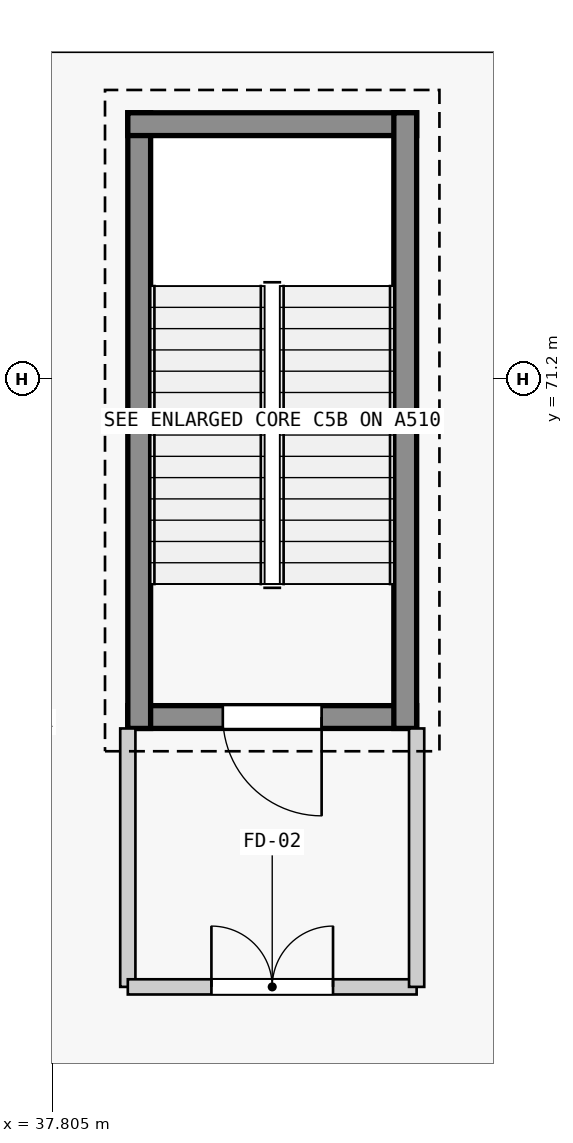
"""IFC4 building model, lengths in metres.
Left out: names, types, materials, properties, quantities, classifications, styles, units other than length and angle.
Written with IfcOpenShell. Run it as: python <this file> out.ifc"""

import sys

from ifc_helpers import new_model, si_unit, direction, frame, frame_2d, origin, place, context, subcontext, project, spatial, rectangle, extrude, element, fill, save


model = new_model("IFC4")
c1 = context("Model", 3, precision=1e-05, world=origin(), true_north=direction((0.0, 1.0)))
c2 = subcontext(c1, "Body", "Model", "MODEL_VIEW")
j1 = project(units=[si_unit("LENGTHUNIT", "METRE"), si_unit("PLANEANGLEUNIT", "RADIAN")], contexts=[c1])
p1 = place(None, origin())
s1 = spatial("IfcSite", under=j1, at=p1, CompositionType="ELEMENT")
p2 = place(p1, origin())
s2 = spatial("IfcBuilding", under=s1, at=p2, CompositionType="ELEMENT")
p3 = place(p2, origin())
s3 = spatial("IfcBuildingStorey", under=s2, at=p3, CompositionType="ELEMENT", Elevation=0.0)
p4 = place(p3, frame((42.6, 66.75, 0.0), z_axis=(0.0, 0.0, 1.0), x_axis=(-1.0, 0.0, 0.0)))
e1 = element("IfcWall", 1, at=p4, inside=s3, PredefinedType="SHEAR", context=c2, shape_type="SweptSolid", body=[
    extrude(rectangle(XDim=3.8, YDim=0.3, at=frame_2d((1.9, 0.0))), origin(), (0.0, 0.0, 1.0), 5.14),
])
p5 = place(p4, frame((1.25, 0.0, 0.0)))
e2 = element("IfcOpeningElement", 2, at=p5, cuts=e1, PredefinedType="OPENING", context=c2, shape_type="SweptSolid", body=[
    extrude(rectangle(XDim=1.3, YDim=2.2, at=frame_2d((0.65, 1.1))), frame((0.0, 0.16, 0.0), z_axis=(0.0, -1.0, 0.0), x_axis=(1.0, 0.0, 0.0)), (0.0, 0.0, 1.0), 0.32),
])
p6 = place(p3, frame((38.95, 66.6, 0.0), z_axis=(0.0, 0.0, 1.0), x_axis=(0.0, 1.0, 0.0)))
e3 = element("IfcWall", 3, at=p6, inside=s3, PredefinedType="SHEAR", context=c2, shape_type="SweptSolid", body=[
    extrude(rectangle(XDim=8.1, YDim=0.3, at=frame_2d((4.05, 0.0))), origin(), (0.0, 0.0, 1.0), 5.14),
])
p7 = place(p3, frame((38.8, 74.55, 0.0), z_axis=(0.0, 0.0, 1.0), x_axis=(1.0, 0.0, 0.0)))
e4 = element("IfcWall", 4, at=p7, inside=s3, PredefinedType="SHEAR", context=c2, shape_type="SweptSolid", body=[
    extrude(rectangle(XDim=3.8, YDim=0.3, at=frame_2d((1.9, 0.0))), origin(), (0.0, 0.0, 1.0), 5.14),
])
p8 = place(p3, frame((42.45, 74.7, 0.0), z_axis=(0.0, 0.0, 1.0), x_axis=(0.0, -1.0, 0.0)))
e5 = element("IfcWall", 5, at=p8, inside=s3, PredefinedType="SHEAR", context=c2, shape_type="SweptSolid", body=[
    extrude(rectangle(XDim=8.1, YDim=0.3, at=frame_2d((4.05, 0.0))), origin(), (0.0, 0.0, 1.0), 5.14),
])
p9 = place(p3, frame((38.8, 66.6, 0.0), z_axis=(0.0, 0.0, 1.0), x_axis=(0.0, -1.0, 0.0)))
e6 = element("IfcWall", 6, at=p9, inside=s3, PredefinedType="STANDARD", context=c2, shape_type="SweptSolid", body=[
    extrude(rectangle(XDim=3.4, YDim=0.2, at=frame_2d((1.7, 0.0))), origin(), (0.0, 0.0, 1.0), 5.14),
])
p10 = place(p3, frame((38.8, 63.2, 0.0), z_axis=(0.0, 0.0, 1.0), x_axis=(1.0, 0.0, 0.0)))
e7 = element("IfcWall", 7, at=p10, inside=s3, PredefinedType="STANDARD", context=c2, shape_type="SweptSolid", body=[
    extrude(rectangle(XDim=3.8, YDim=0.2, at=frame_2d((1.9, 0.0))), origin(), (0.0, 0.0, 1.0), 5.14),
])
p11 = place(p10, frame((1.1, 0.0, 0.0)))
e8 = element("IfcOpeningElement", 8, at=p11, cuts=e7, PredefinedType="OPENING", context=c2, shape_type="SweptSolid", body=[
    extrude(rectangle(XDim=1.6, YDim=2.2, at=frame_2d((0.8, 1.1))), frame((0.0, 0.11, 0.0), z_axis=(0.0, -1.0, 0.0), x_axis=(1.0, 0.0, 0.0)), (0.0, 0.0, 1.0), 0.22),
])
p12 = place(p3, frame((42.6, 63.2, 0.0), z_axis=(0.0, 0.0, 1.0), x_axis=(0.0, 1.0, 0.0)))
e9 = element("IfcWall", 9, at=p12, inside=s3, PredefinedType="STANDARD", context=c2, shape_type="SweptSolid", body=[
    extrude(rectangle(XDim=3.4, YDim=0.2, at=frame_2d((1.7, 0.0))), origin(), (0.0, 0.0, 1.0), 5.14),
])
p13 = place(p5, origin())
e10 = element("IfcDoor", 10, at=p13, inside=s3, OperationType="SINGLE_SWING_LEFT", PredefinedType="DOOR", context=c2, shape_type="SweptSolid", body=[
    extrude(rectangle(XDim=1.3, YDim=2.2, at=frame_2d((0.65, 1.1))), frame((0.0, 0.025, 0.0), z_axis=(0.0, -1.0, 0.0), x_axis=(1.0, 0.0, 0.0)), (0.0, 0.0, 1.0), 0.05),
])
fill(e2, e10)
p14 = place(p11, origin())
e11 = element("IfcDoor", 11, at=p14, inside=s3, OperationType="DOUBLE_DOOR_SINGLE_SWING", PredefinedType="DOOR", context=c2, shape_type="SweptSolid", body=[
    extrude(rectangle(XDim=1.6, YDim=2.2, at=frame_2d((0.8, 1.1))), frame((0.0, 0.025, 0.0), z_axis=(0.0, -1.0, 0.0), x_axis=(1.0, 0.0, 0.0)), (0.0, 0.0, 1.0), 0.05),
])
fill(e8, e11)
save(model, sys.argv[1])
